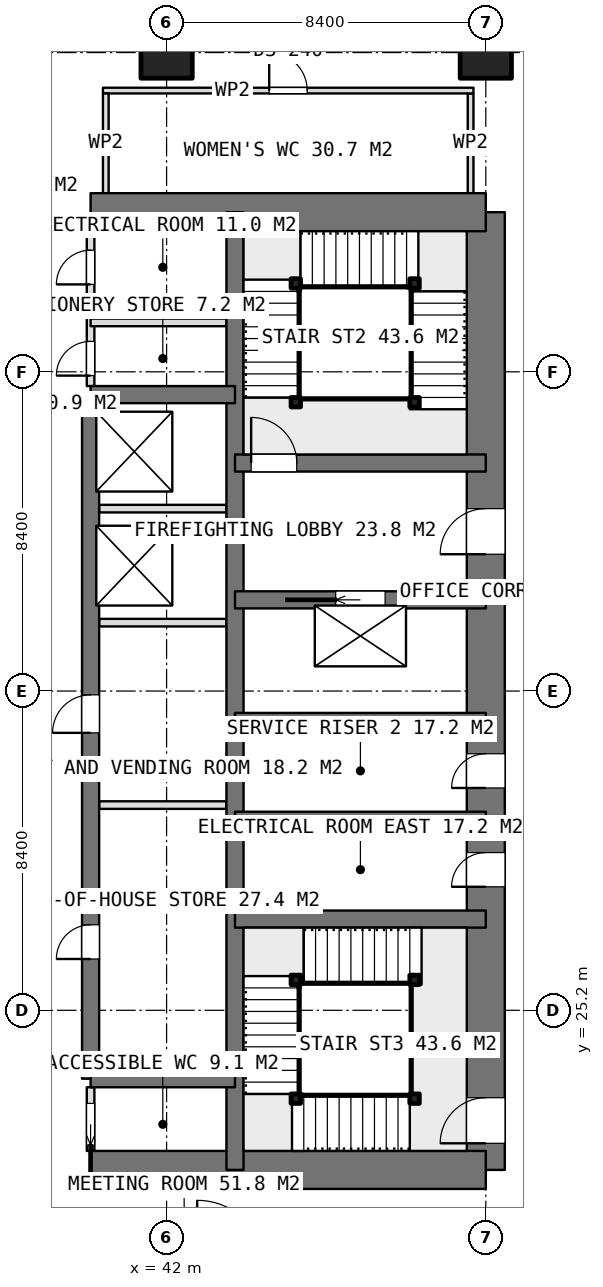
"""IFC4 building model, lengths in metres.
Left out: names, types, materials, properties, quantities, classifications, styles, units other than length and angle.
Written with IfcOpenShell. Run it as: python <this file> out.ifc"""

import sys

from ifc_helpers import new_model, si_unit, direction, frame, frame_2d, origin, origin_2d, place, context, subcontext, project, spatial, rectangle, extrude, element, fill, save


model = new_model("IFC4")
c1 = context("Model", 3, precision=1e-05, world=origin(), true_north=direction((0.0, 1.0)))
c2 = subcontext(c1, "Body", "Model", "MODEL_VIEW")
j1 = project(units=[si_unit("LENGTHUNIT", "METRE"), si_unit("PLANEANGLEUNIT", "RADIAN")], contexts=[c1])
p1 = place(None, origin())
s1 = spatial("IfcSite", under=j1, at=p1, CompositionType="ELEMENT")
p2 = place(p1, origin())
s2 = spatial("IfcBuilding", under=s1, at=p2, CompositionType="ELEMENT")
p3 = place(p2, frame((0.0, 0.0, 221.45)))
s3 = spatial("IfcBuildingStorey", under=s2, at=p3, CompositionType="ELEMENT", Elevation=221.45)
for number, where, z_axis, x_axis in (
    (1, (40.0, 21.0, 0.0), (0.0, 0.0, 1.0), (1.0, 0.0, 0.0)),
    (2, (40.0, 46.2, 0.0), (0.0, 0.0, 1.0), (1.0, 0.0, 0.0)),
):
    element("IfcWall", number, at=place(p3, frame(where, z_axis=z_axis, x_axis=x_axis)), inside=s3, PredefinedType="SHEAR", context=c2, shape_type="SweptSolid", body=[
        extrude(rectangle(XDim=10.4, YDim=1.0, at=frame_2d((5.2, 0.0))), origin(), (0.0, 0.0, 1.0), 3.75),
    ])
p4 = place(p3, frame((50.4, 21.0, 0.0), z_axis=(0.0, 0.0, 1.0), x_axis=(0.0, 1.0, 0.0)))
e3 = element("IfcWall", 3, at=p4, inside=s3, PredefinedType="SHEAR", context=c2, shape_type="SweptSolid", body=[
    extrude(rectangle(XDim=25.2, YDim=1.0, at=frame_2d((12.6, 0.0))), origin(), (0.0, 0.0, 1.0), 3.75),
])
p5 = place(p4, frame((16.2, 0.0, 0.0)))
e4 = element("IfcOpeningElement", 4, at=p5, cuts=e3, PredefinedType="OPENING", context=c2, shape_type="SweptSolid", body=[
    extrude(rectangle(XDim=1.2, YDim=2.1, at=frame_2d((0.6, 1.05))), frame((0.0, 0.51, 0.0), z_axis=(0.0, -1.0, 0.0), x_axis=(1.0, 0.0, 0.0)), (0.0, 0.0, 1.0), 1.02),
])
p6 = place(p4, frame((10.05, 0.0, 0.0)))
e5 = element("IfcOpeningElement", 5, at=p6, cuts=e3, PredefinedType="OPENING", context=c2, shape_type="SweptSolid", body=[
    extrude(rectangle(XDim=0.9, YDim=2.1, at=frame_2d((0.45, 1.05))), frame((0.0, 0.51, 0.0), z_axis=(0.0, -1.0, 0.0), x_axis=(1.0, 0.0, 0.0)), (0.0, 0.0, 1.0), 1.02),
])
p7 = place(p4, frame((7.45, 0.0, 0.0)))
e6 = element("IfcOpeningElement", 6, at=p7, cuts=e3, PredefinedType="OPENING", context=c2, shape_type="SweptSolid", body=[
    extrude(rectangle(XDim=0.9, YDim=2.1, at=frame_2d((0.45, 1.05))), frame((0.0, 0.51, 0.0), z_axis=(0.0, -1.0, 0.0), x_axis=(1.0, 0.0, 0.0)), (0.0, 0.0, 1.0), 1.02),
])
p8 = place(p4, frame((0.7, 0.0, 0.0)))
e7 = element("IfcOpeningElement", 7, at=p8, cuts=e3, PredefinedType="OPENING", context=c2, shape_type="SweptSolid", body=[
    extrude(rectangle(XDim=1.2, YDim=2.1, at=frame_2d((0.6, 1.05))), frame((0.0, 0.51, 0.0), z_axis=(0.0, -1.0, 0.0), x_axis=(1.0, 0.0, 0.0)), (0.0, 0.0, 1.0), 1.02),
])
p9 = place(p3, frame((43.8, 21.0, 0.0), z_axis=(0.0, 0.0, 1.0), x_axis=(0.0, 1.0, 0.0)))
e8 = element("IfcWall", 8, at=p9, inside=s3, PredefinedType="SHEAR", context=c2, shape_type="SweptSolid", body=[
    extrude(rectangle(XDim=25.2, YDim=0.45, at=frame_2d((12.6, 0.0))), origin(), (0.0, 0.0, 1.0), 3.75),
])
p10 = place(p3, frame((40.0, 23.4, 0.0), z_axis=(0.0, 0.0, 1.0), x_axis=(0.0, 1.0, 0.0)))
e9 = element("IfcWall", 9, at=p10, inside=s3, PredefinedType="SHEAR", context=c2, shape_type="SweptSolid", body=[
    extrude(rectangle(XDim=18.0, YDim=0.45, at=frame_2d((9.0, 0.0))), origin(), (0.0, 0.0, 1.0), 3.75),
])
p11 = place(p10, frame((3.15, 0.0, 0.0)))
e10 = element("IfcOpeningElement", 10, at=p11, cuts=e9, PredefinedType="OPENING", context=c2, shape_type="SweptSolid", body=[
    extrude(rectangle(XDim=0.9, YDim=2.1, at=frame_2d((0.45, 1.05))), frame((0.0, 0.235, 0.0), z_axis=(0.0, -1.0, 0.0), x_axis=(1.0, 0.0, 0.0)), (0.0, 0.0, 1.0), 0.47),
])
p12 = place(p10, frame((9.1, 0.0, 0.0)))
e11 = element("IfcOpeningElement", 11, at=p12, cuts=e9, PredefinedType="OPENING", context=c2, shape_type="SweptSolid", body=[
    extrude(rectangle(XDim=1.0, YDim=2.1, at=frame_2d((0.5, 1.05))), frame((0.0, 0.235, 0.0), z_axis=(0.0, -1.0, 0.0), x_axis=(1.0, 0.0, 0.0)), (0.0, 0.0, 1.0), 0.47),
])
for number, where, z_axis, x_axis in (
    (12, (40.0, 23.4, 0.0), (0.0, 0.0, 1.0), (1.0, 0.0, 0.0)),
    (13, (40.0, 41.4, 0.0), (0.0, 0.0, 1.0), (1.0, 0.0, 0.0)),
):
    element("IfcWall", number, at=place(p3, frame(where, z_axis=z_axis, x_axis=x_axis)), inside=s3, PredefinedType="SHEAR", context=c2, shape_type="SweptSolid", body=[
        extrude(rectangle(XDim=3.8, YDim=0.45, at=frame_2d((1.9, 0.0))), origin(), (0.0, 0.0, 1.0), 3.75),
    ])
for number, where, z_axis, x_axis in (
    (14, (43.8, 27.6, 0.0), (0.0, 0.0, 1.0), (1.0, 0.0, 0.0)),
    (15, (43.8, 30.2, 0.0), (0.0, 0.0, 1.0), (1.0, 0.0, 0.0)),
    (16, (43.8, 32.8, 0.0), (0.0, 0.0, 1.0), (1.0, 0.0, 0.0)),
):
    element("IfcWall", number, at=place(p3, frame(where, z_axis=z_axis, x_axis=x_axis)), inside=s3, PredefinedType="SHEAR", context=c2, shape_type="SweptSolid", body=[
        extrude(rectangle(XDim=6.6, YDim=0.45, at=frame_2d((3.3, 0.0))), origin(), (0.0, 0.0, 1.0), 3.75),
    ])
p13 = place(p3, frame((43.8, 36.0, 0.0), z_axis=(0.0, 0.0, 1.0), x_axis=(1.0, 0.0, 0.0)))
e17 = element("IfcWall", 17, at=p13, inside=s3, PredefinedType="SHEAR", context=c2, shape_type="SweptSolid", body=[
    extrude(rectangle(XDim=6.6, YDim=0.45, at=frame_2d((3.3, 0.0))), origin(), (0.0, 0.0, 1.0), 3.75),
])
p14 = place(p13, frame((2.65, 0.0, 0.0)))
e18 = element("IfcOpeningElement", 18, at=p14, cuts=e17, PredefinedType="OPENING", context=c2, shape_type="SweptSolid", body=[
    extrude(rectangle(XDim=1.3, YDim=2.1, at=frame_2d((0.65, 1.05))), frame((0.0, 0.235, 0.0), z_axis=(0.0, -1.0, 0.0), x_axis=(1.0, 0.0, 0.0)), (0.0, 0.0, 1.0), 0.47),
])
p15 = place(p3, frame((43.8, 39.6, 0.0), z_axis=(0.0, 0.0, 1.0), x_axis=(1.0, 0.0, 0.0)))
e19 = element("IfcWall", 19, at=p15, inside=s3, PredefinedType="SHEAR", context=c2, shape_type="SweptSolid", body=[
    extrude(rectangle(XDim=6.6, YDim=0.45, at=frame_2d((3.3, 0.0))), origin(), (0.0, 0.0, 1.0), 3.75),
])
p16 = place(p15, frame((0.425, 0.0, 0.0)))
e20 = element("IfcOpeningElement", 20, at=p16, cuts=e19, PredefinedType="OPENING", context=c2, shape_type="SweptSolid", body=[
    extrude(rectangle(XDim=1.2, YDim=2.1, at=frame_2d((0.6, 1.05))), frame((0.0, 0.235, 0.0), z_axis=(0.0, -1.0, 0.0), x_axis=(1.0, 0.0, 0.0)), (0.0, 0.0, 1.0), 0.47),
])
for number, where, z_axis, x_axis in (
    (21, (42.0, 50.4, 0.0), (0.0, 0.0, 1.0), (1.0, 0.0, 0.0)),
    (22, (50.4, 50.4, 0.0), (0.0, 0.0, 1.0), (1.0, 0.0, 0.0)),
):
    element("IfcColumn", number, at=place(p3, frame(where, z_axis=z_axis, x_axis=x_axis)), inside=s3, PredefinedType="COLUMN", context=c2, shape_type="SweptSolid", body=[
        extrude(rectangle(XDim=1.35, YDim=1.35, at=origin_2d()), origin(), (0.0, 0.0, 1.0), 3.75),
    ])
for number, where, z_axis, x_axis in (
    (23, (40.225, 35.4, 0.0), (0.0, 0.0, 1.0), (1.0, 0.0, 0.0)),
    (24, (40.225, 38.4, 0.0), (0.0, 0.0, 1.0), (1.0, 0.0, 0.0)),
):
    element("IfcWall", number, at=place(p3, frame(where, z_axis=z_axis, x_axis=x_axis)), inside=s3, PredefinedType="PARTITIONING", context=c2, shape_type="SweptSolid", body=[
        extrude(rectangle(XDim=3.35, YDim=0.2, at=frame_2d((1.675, 0.0))), origin(), (0.0, 0.0, 1.0), 3.5),
    ])
p17 = place(p3, frame((40.0, 21.5, 0.0), z_axis=(0.0, 0.0, 1.0), x_axis=(0.0, 1.0, 0.0)))
e25 = element("IfcWall", 25, at=p17, inside=s3, PredefinedType="PARTITIONING", context=c2, shape_type="SweptSolid", body=[
    extrude(rectangle(XDim=1.675, YDim=0.2, at=frame_2d((0.837, 0.0))), origin(), (0.0, 0.0, 1.0), 3.5),
])
p18 = place(p17, frame((0.15, 0.0, 0.0)))
e26 = element("IfcOpeningElement", 26, at=p18, cuts=e25, PredefinedType="OPENING", context=c2, shape_type="SweptSolid", body=[
    extrude(rectangle(XDim=1.1, YDim=2.1, at=frame_2d((0.55, 1.05))), frame((0.0, 0.11, 0.0), z_axis=(0.0, -1.0, 0.0), x_axis=(1.0, 0.0, 0.0)), (0.0, 0.0, 1.0), 0.22),
])
p19 = place(p3, frame((40.0, 41.625, 0.0), z_axis=(0.0, 0.0, 1.0), x_axis=(0.0, 1.0, 0.0)))
e27 = element("IfcWall", 27, at=p19, inside=s3, PredefinedType="PARTITIONING", context=c2, shape_type="SweptSolid", body=[
    extrude(rectangle(XDim=4.075, YDim=0.2, at=frame_2d((2.038, 0.0))), origin(), (0.0, 0.0, 1.0), 3.5),
])
p20 = place(p19, frame((2.675, 0.0, 0.0)))
e28 = element("IfcOpeningElement", 28, at=p20, cuts=e27, PredefinedType="OPENING", context=c2, shape_type="SweptSolid", body=[
    extrude(rectangle(XDim=0.9, YDim=2.1, at=frame_2d((0.45, 1.05))), frame((0.0, 0.11, 0.0), z_axis=(0.0, -1.0, 0.0), x_axis=(1.0, 0.0, 0.0)), (0.0, 0.0, 1.0), 0.22),
])
p21 = place(p19, frame((0.275, 0.0, 0.0)))
e29 = element("IfcOpeningElement", 29, at=p21, cuts=e27, PredefinedType="OPENING", context=c2, shape_type="SweptSolid", body=[
    extrude(rectangle(XDim=0.9, YDim=2.1, at=frame_2d((0.45, 1.05))), frame((0.0, 0.11, 0.0), z_axis=(0.0, -1.0, 0.0), x_axis=(1.0, 0.0, 0.0)), (0.0, 0.0, 1.0), 0.22),
])
p22 = place(p3, frame((40.225, 30.6, 0.0), z_axis=(0.0, 0.0, 1.0), x_axis=(1.0, 0.0, 0.0)))
e30 = element("IfcWall", 30, at=p22, inside=s3, PredefinedType="PARTITIONING", context=c2, shape_type="SweptSolid", body=[
    extrude(rectangle(XDim=3.35, YDim=0.2, at=frame_2d((1.675, 0.0))), origin(), (0.0, 0.0, 1.0), 3.5),
])
p23 = place(p3, frame((40.0, 43.3, 0.0), z_axis=(0.0, 0.0, 1.0), x_axis=(1.0, 0.0, 0.0)))
e31 = element("IfcWall", 31, at=p23, inside=s3, PredefinedType="PARTITIONING", context=c2, shape_type="SweptSolid", body=[
    extrude(rectangle(XDim=3.575, YDim=0.2, at=frame_2d((1.788, 0.0))), origin(), (0.0, 0.0, 1.0), 3.5),
])
p24 = place(p3, frame((40.325, 49.4, 0.0), z_axis=(0.0, 0.0, 1.0), x_axis=(1.0, 0.0, 0.0)))
e32 = element("IfcWall", 32, at=p24, inside=s3, PredefinedType="PARTITIONING", context=c2, shape_type="SweptSolid", body=[
    extrude(rectangle(XDim=9.75, YDim=0.15, at=frame_2d((4.875, 0.0))), origin(), (0.0, 0.0, 1.0), 3.5),
])
p25 = place(p24, frame((4.375, 0.0, 0.0)))
e33 = element("IfcOpeningElement", 33, at=p25, cuts=e32, PredefinedType="OPENING", context=c2, shape_type="SweptSolid", body=[
    extrude(rectangle(XDim=1.0, YDim=2.1, at=frame_2d((0.5, 1.05))), frame((0.0, 0.085, 0.0), z_axis=(0.0, -1.0, 0.0), x_axis=(1.0, 0.0, 0.0)), (0.0, 0.0, 1.0), 0.17),
])
for number, where, z_axis, x_axis in (
    (34, (40.4, 46.7, 0.0), (0.0, 0.0, 1.0), (0.0, 1.0, 0.0)),
    (35, (50.0, 46.7, 0.0), (0.0, 0.0, 1.0), (0.0, 1.0, 0.0)),
):
    element("IfcWall", number, at=place(p3, frame(where, z_axis=z_axis, x_axis=x_axis)), inside=s3, PredefinedType="PARTITIONING", context=c2, shape_type="SweptSolid", body=[
        extrude(rectangle(XDim=2.625, YDim=0.15, at=frame_2d((1.312, 0.0))), origin(), (0.0, 0.0, 1.0), 3.5),
    ])
for number, where, z_axis, x_axis in (
    (36, (45.4, 41.2, 0.0), (0.0, 0.0, 1.0), (1.0, 0.0, 0.0)),
    (37, (45.4, 44.325, 0.0), (0.0, 0.0, 1.0), (1.0, 0.0, 0.0)),
    (38, (48.525, 44.325, 0.0), (0.0, 0.0, 1.0), (1.0, 0.0, 0.0)),
    (39, (48.525, 41.2, 0.0), (0.0, 0.0, 1.0), (1.0, 0.0, 0.0)),
    (40, (48.525, 22.875, 0.0), (0.0, 0.0, 1.0), (1.0, 0.0, 0.0)),
    (41, (45.4, 22.875, 0.0), (0.0, 0.0, 1.0), (1.0, 0.0, 0.0)),
    (42, (45.4, 26.0, 0.0), (0.0, 0.0, 1.0), (1.0, 0.0, 0.0)),
    (43, (48.525, 26.0, 0.0), (0.0, 0.0, 1.0), (1.0, 0.0, 0.0)),
):
    element("IfcColumn", number, at=place(p3, frame(where, z_axis=z_axis, x_axis=x_axis)), inside=s3, PredefinedType="COLUMN", context=c2, shape_type="SweptSolid", body=[
        extrude(rectangle(XDim=0.25, YDim=0.25, at=origin_2d()), origin(), (0.0, 0.0, 1.0), 3.75),
    ])
p26 = place(p5, origin())
e44 = element("IfcDoor", 44, at=p26, inside=s3, OperationType="SINGLE_SWING_LEFT", PredefinedType="DOOR", context=c2, shape_type="SweptSolid", body=[
    extrude(rectangle(XDim=1.2, YDim=2.1, at=frame_2d((0.6, 1.05))), frame((0.0, 0.025, 0.0), z_axis=(0.0, -1.0, 0.0), x_axis=(1.0, 0.0, 0.0)), (0.0, 0.0, 1.0), 0.05),
])
fill(e4, e44)
p27 = place(p6, origin())
e45 = element("IfcDoor", 45, at=p27, inside=s3, OperationType="SINGLE_SWING_LEFT", PredefinedType="DOOR", context=c2, shape_type="SweptSolid", body=[
    extrude(rectangle(XDim=0.9, YDim=2.1, at=frame_2d((0.45, 1.05))), frame((0.0, 0.025, 0.0), z_axis=(0.0, -1.0, 0.0), x_axis=(1.0, 0.0, 0.0)), (0.0, 0.0, 1.0), 0.05),
])
fill(e5, e45)
p28 = place(p7, origin())
e46 = element("IfcDoor", 46, at=p28, inside=s3, OperationType="SINGLE_SWING_LEFT", PredefinedType="DOOR", context=c2, shape_type="SweptSolid", body=[
    extrude(rectangle(XDim=0.9, YDim=2.1, at=frame_2d((0.45, 1.05))), frame((0.0, 0.025, 0.0), z_axis=(0.0, -1.0, 0.0), x_axis=(1.0, 0.0, 0.0)), (0.0, 0.0, 1.0), 0.05),
])
fill(e6, e46)
p29 = place(p18, origin())
e47 = element("IfcDoor", 47, at=p29, inside=s3, OperationType="SLIDING_TO_LEFT", PredefinedType="DOOR", context=c2, shape_type="SweptSolid", body=[
    extrude(rectangle(XDim=1.1, YDim=2.1, at=frame_2d((0.55, 1.05))), frame((0.0, 0.025, 0.0), z_axis=(0.0, -1.0, 0.0), x_axis=(1.0, 0.0, 0.0)), (0.0, 0.0, 1.0), 0.05),
])
fill(e26, e47)
p30 = place(p20, origin())
e48 = element("IfcDoor", 48, at=p30, inside=s3, OperationType="SINGLE_SWING_LEFT", PredefinedType="DOOR", context=c2, shape_type="SweptSolid", body=[
    extrude(rectangle(XDim=0.9, YDim=2.1, at=frame_2d((0.45, 1.05))), frame((0.0, 0.025, 0.0), z_axis=(0.0, -1.0, 0.0), x_axis=(1.0, 0.0, 0.0)), (0.0, 0.0, 1.0), 0.05),
])
fill(e28, e48)
p31 = place(p21, origin())
e49 = element("IfcDoor", 49, at=p31, inside=s3, OperationType="SINGLE_SWING_LEFT", PredefinedType="DOOR", context=c2, shape_type="SweptSolid", body=[
    extrude(rectangle(XDim=0.9, YDim=2.1, at=frame_2d((0.45, 1.05))), frame((0.0, 0.025, 0.0), z_axis=(0.0, -1.0, 0.0), x_axis=(1.0, 0.0, 0.0)), (0.0, 0.0, 1.0), 0.05),
])
fill(e29, e49)
p32 = place(p11, origin())
e50 = element("IfcDoor", 50, at=p32, inside=s3, OperationType="SINGLE_SWING_LEFT", PredefinedType="DOOR", context=c2, shape_type="SweptSolid", body=[
    extrude(rectangle(XDim=0.9, YDim=2.1, at=frame_2d((0.45, 1.05))), frame((0.0, 0.025, 0.0), z_axis=(0.0, -1.0, 0.0), x_axis=(1.0, 0.0, 0.0)), (0.0, 0.0, 1.0), 0.05),
])
fill(e10, e50)
p33 = place(p12, origin())
e51 = element("IfcDoor", 51, at=p33, inside=s3, OperationType="SINGLE_SWING_LEFT", PredefinedType="DOOR", context=c2, shape_type="SweptSolid", body=[
    extrude(rectangle(XDim=1.0, YDim=2.1, at=frame_2d((0.5, 1.05))), frame((0.0, 0.025, 0.0), z_axis=(0.0, -1.0, 0.0), x_axis=(1.0, 0.0, 0.0)), (0.0, 0.0, 1.0), 0.05),
])
fill(e11, e51)
p34 = place(p14, origin())
e52 = element("IfcDoor", 52, at=p34, inside=s3, OperationType="SLIDING_TO_LEFT", PredefinedType="USERDEFINED", context=c2, shape_type="SweptSolid", body=[
    extrude(rectangle(XDim=1.3, YDim=2.1, at=frame_2d((0.65, 1.05))), frame((0.0, 0.025, 0.0), z_axis=(0.0, -1.0, 0.0), x_axis=(1.0, 0.0, 0.0)), (0.0, 0.0, 1.0), 0.05),
])
fill(e18, e52)
p35 = place(p25, origin())
e53 = element("IfcDoor", 53, at=p35, inside=s3, OperationType="SINGLE_SWING_LEFT", PredefinedType="DOOR", context=c2, shape_type="SweptSolid", body=[
    extrude(rectangle(XDim=1.0, YDim=2.1, at=frame_2d((0.5, 1.05))), frame((0.0, 0.025, 0.0), z_axis=(0.0, -1.0, 0.0), x_axis=(1.0, 0.0, 0.0)), (0.0, 0.0, 1.0), 0.05),
])
fill(e33, e53)
p36 = place(p16, origin())
e54 = element("IfcDoor", 54, at=p36, inside=s3, OperationType="SINGLE_SWING_RIGHT", PredefinedType="DOOR", context=c2, shape_type="SweptSolid", body=[
    extrude(rectangle(XDim=1.2, YDim=2.1, at=frame_2d((0.6, 1.05))), frame((0.0, 0.025, 0.0), z_axis=(0.0, -1.0, 0.0), x_axis=(1.0, 0.0, 0.0)), (0.0, 0.0, 1.0), 0.05),
])
fill(e20, e54)
p37 = place(p8, origin())
e55 = element("IfcDoor", 55, at=p37, inside=s3, OperationType="SINGLE_SWING_RIGHT", PredefinedType="DOOR", context=c2, shape_type="SweptSolid", body=[
    extrude(rectangle(XDim=1.2, YDim=2.1, at=frame_2d((0.6, 1.05))), frame((0.0, 0.025, 0.0), z_axis=(0.0, -1.0, 0.0), x_axis=(1.0, 0.0, 0.0)), (0.0, 0.0, 1.0), 0.05),
])
fill(e7, e55)
save(model, sys.argv[1])
